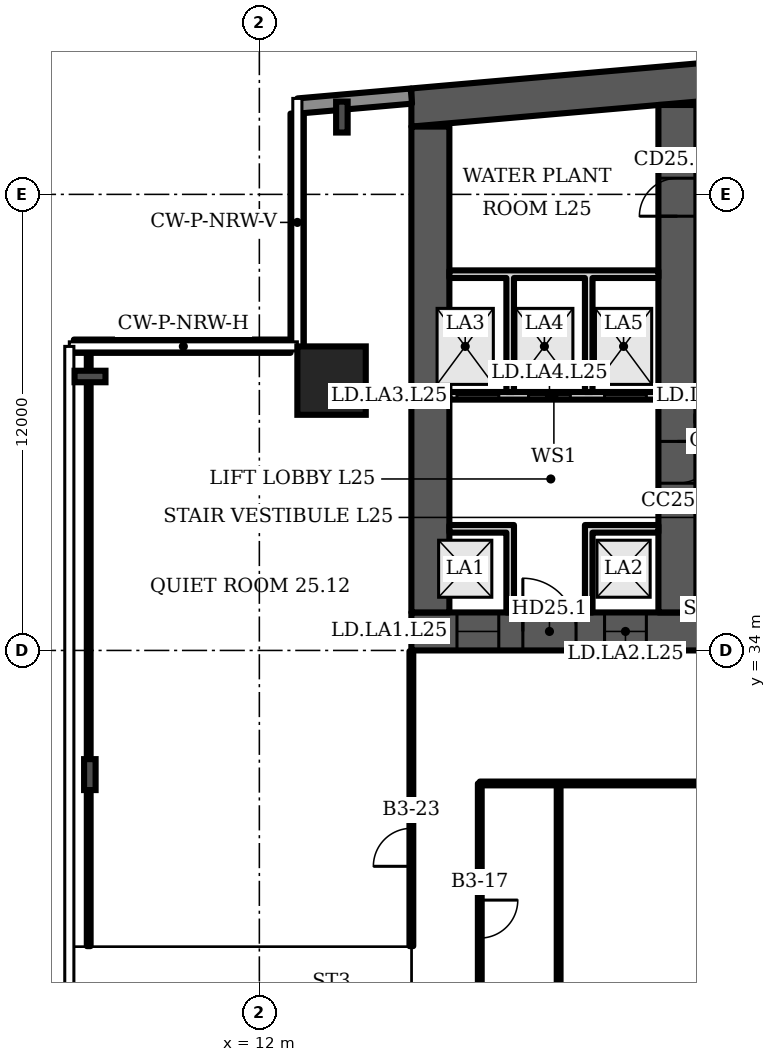
"""IFC4 building model, lengths in metres.
Left out: names, types, materials, properties, quantities, classifications, styles, units other than length and angle.
Written with IfcOpenShell. Run it as: python <this file> out.ifc"""

import sys

from ifc_helpers import new_model, si_unit, direction, frame, frame_2d, origin, origin_2d, place, context, subcontext, project, spatial, polyline, rectangle, i_section, outline, extrude, element, fill, save


model = new_model("IFC4")
c1 = context("Model", 3, precision=1e-05, world=origin(), true_north=direction((0.0, 1.0)))
c2 = subcontext(c1, "Body", "Model", "MODEL_VIEW")
j1 = project(units=[si_unit("LENGTHUNIT", "METRE"), si_unit("PLANEANGLEUNIT", "RADIAN")], contexts=[c1])
p1 = place(None, origin())
s1 = spatial("IfcSite", under=j1, at=p1, CompositionType="ELEMENT")
p2 = place(p1, origin())
s2 = spatial("IfcBuilding", under=s1, at=p2, CompositionType="ELEMENT")
p3 = place(p2, frame((0.0, 0.0, 111.1)))
s3 = spatial("IfcBuildingStorey", under=s2, at=p3, CompositionType="ELEMENT", Elevation=111.1)
p4 = place(p3, frame((0.0, 0.0, -0.0)))
e1 = element("IfcWall", 1, at=p4, inside=s3, PredefinedType="SHEAR", context=c2, shape_type="SweptSolid", body=[
    extrude(outline(polyline([(16.0, 47.784), (40.5, 49.927), (65.0, 47.784), (65.0, 48.787), (40.5, 50.931), (16.0, 48.787), (16.0, 47.784)])), origin(), (0.0, 0.0, 1.0), 3.6),
])
p5 = place(p3, frame((16.0, 34.5, 0.0), z_axis=(0.0, 0.0, 1.0), x_axis=(1.0, 0.0, 0.0)))
e2 = element("IfcWall", 2, at=p5, inside=s3, PredefinedType="SHEAR", context=c2, shape_type="SweptSolid", body=[
    extrude(rectangle(XDim=49.0, YDim=1.0, at=frame_2d((24.5, 0.0))), origin(), (0.0, 0.0, 1.0), 3.6),
])
p6 = place(p5, frame((1.2, 0.0, 0.0)))
e3 = element("IfcOpeningElement", 3, at=p6, cuts=e2, PredefinedType="OPENING", context=c2, shape_type="SweptSolid", body=[
    extrude(rectangle(XDim=1.1, YDim=2.1, at=frame_2d((0.55, 1.05))), frame((0.0, 0.51, 0.0), z_axis=(0.0, -1.0, 0.0), x_axis=(1.0, 0.0, 0.0)), (0.0, 0.0, 1.0), 1.02),
])
p7 = place(p5, frame((5.083, 0.0, 0.0)))
e4 = element("IfcOpeningElement", 4, at=p7, cuts=e2, PredefinedType="OPENING", context=c2, shape_type="SweptSolid", body=[
    extrude(rectangle(XDim=1.1, YDim=2.1, at=frame_2d((0.55, 1.05))), frame((0.0, 0.51, 0.0), z_axis=(0.0, -1.0, 0.0), x_axis=(1.0, 0.0, 0.0)), (0.0, 0.0, 1.0), 1.02),
])
p8 = place(p5, frame((2.933, 0.0, 0.0)))
e5 = element("IfcOpeningElement", 5, at=p8, cuts=e2, PredefinedType="OPENING", context=c2, shape_type="SweptSolid", body=[
    extrude(rectangle(XDim=1.4, YDim=2.1, at=frame_2d((0.7, 1.05))), frame((0.0, 0.51, 0.0), z_axis=(0.0, -1.0, 0.0), x_axis=(1.0, 0.0, 0.0)), (0.0, 0.0, 1.0), 1.02),
])
p9 = place(p5, frame((7.65, 0.0, 0.0)))
e6 = element("IfcOpeningElement", 6, at=p9, cuts=e2, PredefinedType="OPENING", context=c2, shape_type="SweptSolid", body=[
    extrude(rectangle(XDim=1.2, YDim=2.1, at=frame_2d((0.6, 1.05))), frame((0.0, 0.51, 0.0), z_axis=(0.0, -1.0, 0.0), x_axis=(1.0, 0.0, 0.0)), (0.0, 0.0, 1.0), 1.02),
])
p10 = place(p5, frame((14.817, 0.0, 0.0)))
e7 = element("IfcOpeningElement", 7, at=p10, cuts=e2, PredefinedType="OPENING", context=c2, shape_type="SweptSolid", body=[
    extrude(rectangle(XDim=1.1, YDim=2.1, at=frame_2d((0.55, 1.05))), frame((0.0, 0.51, 0.0), z_axis=(0.0, -1.0, 0.0), x_axis=(1.0, 0.0, 0.0)), (0.0, 0.0, 1.0), 1.02),
])
p11 = place(p5, frame((19.083, 0.0, 0.0)))
e8 = element("IfcOpeningElement", 8, at=p11, cuts=e2, PredefinedType="OPENING", context=c2, shape_type="SweptSolid", body=[
    extrude(rectangle(XDim=1.1, YDim=2.1, at=frame_2d((0.55, 1.05))), frame((0.0, 0.51, 0.0), z_axis=(0.0, -1.0, 0.0), x_axis=(1.0, 0.0, 0.0)), (0.0, 0.0, 1.0), 1.02),
])
p12 = place(p5, frame((16.8, 0.0, 0.0)))
e9 = element("IfcOpeningElement", 9, at=p12, cuts=e2, PredefinedType="OPENING", context=c2, shape_type="SweptSolid", body=[
    extrude(rectangle(XDim=1.4, YDim=2.1, at=frame_2d((0.7, 1.05))), frame((0.0, 0.51, 0.0), z_axis=(0.0, -1.0, 0.0), x_axis=(1.0, 0.0, 0.0)), (0.0, 0.0, 1.0), 1.02),
])
p13 = place(p5, frame((21.817, 0.0, 0.0)))
e10 = element("IfcOpeningElement", 10, at=p13, cuts=e2, PredefinedType="OPENING", context=c2, shape_type="SweptSolid", body=[
    extrude(rectangle(XDim=1.1, YDim=2.1, at=frame_2d((0.55, 1.05))), frame((0.0, 0.51, 0.0), z_axis=(0.0, -1.0, 0.0), x_axis=(1.0, 0.0, 0.0)), (0.0, 0.0, 1.0), 1.02),
])
p14 = place(p5, frame((26.083, 0.0, 0.0)))
e11 = element("IfcOpeningElement", 11, at=p14, cuts=e2, PredefinedType="OPENING", context=c2, shape_type="SweptSolid", body=[
    extrude(rectangle(XDim=1.1, YDim=2.1, at=frame_2d((0.55, 1.05))), frame((0.0, 0.51, 0.0), z_axis=(0.0, -1.0, 0.0), x_axis=(1.0, 0.0, 0.0)), (0.0, 0.0, 1.0), 1.02),
])
p15 = place(p5, frame((33.15, 0.0, 0.0)))
e12 = element("IfcOpeningElement", 12, at=p15, cuts=e2, PredefinedType="OPENING", context=c2, shape_type="SweptSolid", body=[
    extrude(rectangle(XDim=1.2, YDim=2.1, at=frame_2d((0.6, 1.05))), frame((0.0, 0.51, 0.0), z_axis=(0.0, -1.0, 0.0), x_axis=(1.0, 0.0, 0.0)), (0.0, 0.0, 1.0), 1.02),
])
p16 = place(p5, frame((37.8, 0.0, 0.0)))
e13 = element("IfcOpeningElement", 13, at=p16, cuts=e2, PredefinedType="OPENING", context=c2, shape_type="SweptSolid", body=[
    extrude(rectangle(XDim=1.4, YDim=2.1, at=frame_2d((0.7, 1.05))), frame((0.0, 0.51, 0.0), z_axis=(0.0, -1.0, 0.0), x_axis=(1.0, 0.0, 0.0)), (0.0, 0.0, 1.0), 1.02),
])
p17 = place(p5, frame((42.817, 0.0, 0.0)))
e14 = element("IfcOpeningElement", 14, at=p17, cuts=e2, PredefinedType="OPENING", context=c2, shape_type="SweptSolid", body=[
    extrude(rectangle(XDim=1.1, YDim=2.1, at=frame_2d((0.55, 1.05))), frame((0.0, 0.51, 0.0), z_axis=(0.0, -1.0, 0.0), x_axis=(1.0, 0.0, 0.0)), (0.0, 0.0, 1.0), 1.02),
])
p18 = place(p5, frame((46.7, 0.0, 0.0)))
e15 = element("IfcOpeningElement", 15, at=p18, cuts=e2, PredefinedType="OPENING", context=c2, shape_type="SweptSolid", body=[
    extrude(rectangle(XDim=1.1, YDim=2.1, at=frame_2d((0.55, 1.05))), frame((0.0, 0.51, 0.0), z_axis=(0.0, -1.0, 0.0), x_axis=(1.0, 0.0, 0.0)), (0.0, 0.0, 1.0), 1.02),
])
p19 = place(p5, frame((44.667, 0.0, 0.0)))
e16 = element("IfcOpeningElement", 16, at=p19, cuts=e2, PredefinedType="OPENING", context=c2, shape_type="SweptSolid", body=[
    extrude(rectangle(XDim=1.4, YDim=2.1, at=frame_2d((0.7, 1.05))), frame((0.0, 0.51, 0.0), z_axis=(0.0, -1.0, 0.0), x_axis=(1.0, 0.0, 0.0)), (0.0, 0.0, 1.0), 1.02),
])
p20 = place(p3, frame((16.5, 35.0, 0.0), z_axis=(0.0, 0.0, 1.0), x_axis=(0.0, 1.0, 0.0)))
e17 = element("IfcWall", 17, at=p20, inside=s3, PredefinedType="SHEAR", context=c2, shape_type="SweptSolid", body=[
    extrude(rectangle(XDim=12.784, YDim=1.0, at=frame_2d((6.392, 0.0))), origin(), (0.0, 0.0, 1.0), 3.6),
])
p21 = place(p3, frame((23.0, 35.0, 0.0), z_axis=(0.0, 0.0, 1.0), x_axis=(0.0, 1.0, 0.0)))
e18 = element("IfcWall", 18, at=p21, inside=s3, PredefinedType="SHEAR", context=c2, shape_type="SweptSolid", body=[
    extrude(rectangle(XDim=13.352, YDim=1.0, at=frame_2d((6.676, 0.0))), origin(), (0.0, 0.0, 1.0), 3.6),
])
p22 = place(p21, frame((10.426, 0.0, 0.0)))
e19 = element("IfcOpeningElement", 19, at=p22, cuts=e18, PredefinedType="OPENING", context=c2, shape_type="SweptSolid", body=[
    extrude(rectangle(XDim=1.0, YDim=2.1, at=frame_2d((0.5, 1.05))), frame((0.0, 0.51, 0.0), z_axis=(0.0, -1.0, 0.0), x_axis=(1.0, 0.0, 0.0)), (0.0, 0.0, 1.0), 1.02),
])
p23 = place(p21, frame((3.4, 0.0, 0.0)))
e20 = element("IfcOpeningElement", 20, at=p23, cuts=e18, PredefinedType="OPENING", context=c2, shape_type="SweptSolid", body=[
    extrude(rectangle(XDim=1.1, YDim=2.1, at=frame_2d((0.55, 1.05))), frame((0.0, 0.51, 0.0), z_axis=(0.0, -1.0, 0.0), x_axis=(1.0, 0.0, 0.0)), (0.0, 0.0, 1.0), 1.02),
])
p24 = place(p3, frame((13.9, 41.1, 0.0), z_axis=(0.0, 0.0, 1.0), x_axis=(1.0, 0.0, 0.0)))
e21 = element("IfcColumn", 21, at=p24, inside=s3, PredefinedType="COLUMN", context=c2, shape_type="SweptSolid", body=[
    extrude(rectangle(XDim=1.8, YDim=1.8, at=origin_2d()), origin(), (0.0, 0.0, 1.0), 3.6),
])
for number, where, z_axis, x_axis in (
    (22, (14.172, 48.034, 0.0), (0.0, 0.0, 1.0), (-1.0, 0.0, 0.0)),
    (23, (7.544, 41.208, 0.0), (0.0, 0.0, 1.0), (0.0, 1.0, 0.0)),
    (24, (7.54, 30.733, 0.0), (0.0, 0.0, 1.0), (-1.0, 0.0, 0.0)),
):
    element("IfcColumn", number, at=place(p3, frame(where, z_axis=z_axis, x_axis=x_axis)), inside=s3, PredefinedType="COLUMN", context=c2, shape_type="SweptSolid", body=[
        extrude(i_section(OverallWidth=0.303, OverallDepth=0.814, WebThickness=0.021, FlangeThickness=0.04, FilletRadius=0.03, at=origin_2d()), origin(), (0.0, 0.0, 1.0), 3.6),
    ])
p25 = place(p3, frame((16.0, 48.587, 0.0), z_axis=(0.0, 0.0, 1.0), x_axis=(-0.996194, -0.087168, 0.0)))
e25 = element("IfcWall", 25, at=p25, inside=s3, PredefinedType="SOLIDWALL", context=c2, shape_type="SweptSolid", body=[
    extrude(rectangle(XDim=2.994, YDim=0.4, at=frame_2d((1.497, 0.0))), origin(), (0.0, 0.0, 1.0), 3.2),
])
p26 = place(p3, frame((12.995, 48.126, 0.0), z_axis=(0.0, 0.0, 1.0), x_axis=(0.0, -1.0, 0.0)))
e26 = element("IfcWall", 26, at=p26, inside=s3, PredefinedType="SOLIDWALL", context=c2, shape_type="SweptSolid", body=[
    extrude(rectangle(XDim=6.126, YDim=0.35, at=frame_2d((3.063, 0.0))), origin(), (0.0, 0.0, 1.0), 1.0),
])
p27 = place(p3, frame((12.82, 42.005, 0.0), z_axis=(0.0, 0.0, 1.0), x_axis=(-1.0, 0.0, 0.0)))
e27 = element("IfcWall", 27, at=p27, inside=s3, PredefinedType="SOLIDWALL", context=c2, shape_type="SweptSolid", body=[
    extrude(rectangle(XDim=5.7, YDim=0.35, at=frame_2d((2.85, 0.0))), origin(), (0.0, 0.0, 1.0), 1.0),
])
p28 = place(p3, frame((17.0, 40.7, 0.0), z_axis=(0.0, 0.0, 1.0), x_axis=(1.0, 0.0, 0.0)))
e28 = element("IfcWall", 28, at=p28, inside=s3, PredefinedType="PARTITIONING", context=c2, shape_type="SweptSolid", body=[
    extrude(rectangle(XDim=5.5, YDim=0.2, at=frame_2d((2.75, 0.0))), origin(), (0.0, 0.0, 1.0), 3.2),
])
p29 = place(p28, frame((0.2, 0.0, 0.0)))
e29 = element("IfcOpeningElement", 29, at=p29, cuts=e28, PredefinedType="OPENING", context=c2, shape_type="SweptSolid", body=[
    extrude(rectangle(XDim=1.1, YDim=2.1, at=frame_2d((0.55, 1.05))), frame((0.0, 0.11, 0.0), z_axis=(0.0, -1.0, 0.0), x_axis=(1.0, 0.0, 0.0)), (0.0, 0.0, 1.0), 0.22),
])
p30 = place(p28, frame((2.083, 0.0, 0.0)))
e30 = element("IfcOpeningElement", 30, at=p30, cuts=e28, PredefinedType="OPENING", context=c2, shape_type="SweptSolid", body=[
    extrude(rectangle(XDim=1.1, YDim=2.1, at=frame_2d((0.55, 1.05))), frame((0.0, 0.11, 0.0), z_axis=(0.0, -1.0, 0.0), x_axis=(1.0, 0.0, 0.0)), (0.0, 0.0, 1.0), 0.22),
])
p31 = place(p28, frame((4.083, 0.0, 0.0)))
e31 = element("IfcOpeningElement", 31, at=p31, cuts=e28, PredefinedType="OPENING", context=c2, shape_type="SweptSolid", body=[
    extrude(rectangle(XDim=1.1, YDim=2.1, at=frame_2d((0.55, 1.05))), frame((0.0, 0.11, 0.0), z_axis=(0.0, -1.0, 0.0), x_axis=(1.0, 0.0, 0.0)), (0.0, 0.0, 1.0), 0.22),
])
p32 = place(p3, frame((0.0, 0.0, -0.0)))
e32 = element("IfcWall", 32, at=p32, inside=s3, PredefinedType="PARTITIONING", context=c2, shape_type="SweptSolid", body=[
    extrude(outline(polyline([(18.5, 37.1), (17.0, 37.1), (17.0, 37.3), (18.5, 37.3), (18.7, 37.3), (18.7, 35.0), (18.5, 35.0), (18.5, 37.1)])), origin(), (0.0, 0.0, 1.0), 3.2),
])
p33 = place(p3, frame((0.0, 0.0, -0.0)))
e33 = element("IfcWall", 33, at=p33, inside=s3, PredefinedType="PARTITIONING", context=c2, shape_type="SweptSolid", body=[
    extrude(outline(polyline([(20.567, 37.3), (20.767, 37.3), (22.5, 37.3), (22.5, 37.1), (20.767, 37.1), (20.767, 35.0), (20.567, 35.0), (20.567, 37.3)])), origin(), (0.0, 0.0, 1.0), 3.2),
])
p34 = place(p3, frame((0.0, 0.0, -0.0)))
e34 = element("IfcWall", 34, at=p34, inside=s3, PredefinedType="PARTITIONING", context=c2, shape_type="SweptSolid", body=[
    extrude(outline(polyline([(18.7, 40.8), (18.5, 40.8), (18.5, 43.8), (17.0, 43.8), (17.0, 44.0), (22.5, 44.0), (22.5, 43.8), (20.767, 43.8), (20.767, 40.8), (20.567, 40.8), (20.567, 43.8), (18.7, 43.8), (18.7, 40.8)])), origin(), (0.0, 0.0, 1.0), 3.2),
])
p35 = place(p3, frame((7.51, 26.22, 0.0), z_axis=(0.0, 0.0, 1.0), x_axis=(0.0, 1.0, 0.0)))
e35 = element("IfcWall", 35, at=p35, inside=s3, PredefinedType="PARTITIONING", context=c2, shape_type="SweptSolid", body=[
    extrude(rectangle(XDim=15.76, YDim=0.1, at=frame_2d((7.88, 0.0))), origin(), (0.0, 0.0, 1.0), 2.58),
])
p36 = place(p3, frame((16.0, 26.22, 0.0), z_axis=(0.0, 0.0, 1.0), x_axis=(0.0, 1.0, 0.0)))
e36 = element("IfcWall", 36, at=p36, inside=s3, PredefinedType="PARTITIONING", context=c2, shape_type="SweptSolid", body=[
    extrude(rectangle(XDim=7.76, YDim=0.1, at=frame_2d((3.88, 0.0))), origin(), (0.0, 0.0, 1.0), 3.2),
])
p37 = place(p36, frame((2.1, 0.0, 0.0)))
e37 = element("IfcOpeningElement", 37, at=p37, cuts=e36, PredefinedType="OPENING", context=c2, shape_type="SweptSolid", body=[
    extrude(rectangle(XDim=1.0, YDim=2.1, at=frame_2d((0.5, 1.05))), frame((0.0, 0.06, 0.0), z_axis=(0.0, -1.0, 0.0), x_axis=(1.0, 0.0, 0.0)), (0.0, 0.0, 1.0), 0.12),
])
p38 = place(p3, frame((17.8, 21.8, 0.0), z_axis=(0.0, 0.0, 1.0), x_axis=(0.0, 1.0, 0.0)))
e38 = element("IfcWall", 38, at=p38, inside=s3, PredefinedType="PARTITIONING", context=c2, shape_type="SweptSolid", body=[
    extrude(rectangle(XDim=8.7, YDim=0.1, at=frame_2d((4.35, 0.0))), origin(), (0.0, 0.0, 1.0), 3.2),
])
p39 = place(p38, frame((4.631, 0.0, 0.0)))
e39 = element("IfcOpeningElement", 39, at=p39, cuts=e38, PredefinedType="OPENING", context=c2, shape_type="SweptSolid", body=[
    extrude(rectangle(XDim=1.0, YDim=2.1, at=frame_2d((0.5, 1.05))), frame((0.0, 0.06, 0.0), z_axis=(0.0, -1.0, 0.0), x_axis=(1.0, 0.0, 0.0)), (0.0, 0.0, 1.0), 0.12),
])
p40 = place(p3, frame((17.8, 30.5, 0.0), z_axis=(0.0, 0.0, 1.0), x_axis=(1.0, 0.0, 0.0)))
e40 = element("IfcWall", 40, at=p40, inside=s3, PredefinedType="PARTITIONING", context=c2, shape_type="SweptSolid", body=[
    extrude(rectangle(XDim=13.8, YDim=0.1, at=frame_2d((6.9, 0.0))), origin(), (0.0, 0.0, 1.0), 3.2),
])
p41 = place(p3, frame((19.875, 15.13, 0.0), z_axis=(0.0, 0.0, 1.0), x_axis=(0.0, 1.0, 0.0)))
e41 = element("IfcWall", 41, at=p41, inside=s3, PredefinedType="PARTITIONING", context=c2, shape_type="SweptSolid", body=[
    extrude(rectangle(XDim=15.37, YDim=0.1, at=frame_2d((7.685, 0.0))), origin(), (0.0, 0.0, 1.0), 3.2),
])
p42 = place(p6, origin())
e42 = element("IfcDoor", 42, at=p42, inside=s3, OperationType="DOUBLE_DOOR_SLIDING", PredefinedType="DOOR", context=c2, shape_type="SweptSolid", body=[
    extrude(rectangle(XDim=1.1, YDim=2.1, at=frame_2d((0.55, 1.05))), frame((0.0, 0.025, 0.0), z_axis=(0.0, -1.0, 0.0), x_axis=(1.0, 0.0, 0.0)), (0.0, 0.0, 1.0), 0.05),
])
fill(e3, e42)
p43 = place(p7, origin())
e43 = element("IfcDoor", 43, at=p43, inside=s3, OperationType="DOUBLE_DOOR_SLIDING", PredefinedType="DOOR", context=c2, shape_type="SweptSolid", body=[
    extrude(rectangle(XDim=1.1, YDim=2.1, at=frame_2d((0.55, 1.05))), frame((0.0, 0.025, 0.0), z_axis=(0.0, -1.0, 0.0), x_axis=(1.0, 0.0, 0.0)), (0.0, 0.0, 1.0), 0.05),
])
fill(e4, e43)
p44 = place(p8, origin())
e44 = element("IfcDoor", 44, at=p44, inside=s3, OperationType="DOUBLE_DOOR_SINGLE_SWING", PredefinedType="DOOR", context=c2, shape_type="SweptSolid", body=[
    extrude(rectangle(XDim=1.4, YDim=2.1, at=frame_2d((0.7, 1.05))), frame((0.0, 0.025, 0.0), z_axis=(0.0, -1.0, 0.0), x_axis=(1.0, 0.0, 0.0)), (0.0, 0.0, 1.0), 0.05),
])
fill(e5, e44)
p45 = place(p29, origin())
e45 = element("IfcDoor", 45, at=p45, inside=s3, OperationType="DOUBLE_DOOR_SLIDING", PredefinedType="DOOR", context=c2, shape_type="SweptSolid", body=[
    extrude(rectangle(XDim=1.1, YDim=2.1, at=frame_2d((0.55, 1.05))), frame((0.0, 0.025, 0.0), z_axis=(0.0, -1.0, 0.0), x_axis=(1.0, 0.0, 0.0)), (0.0, 0.0, 1.0), 0.05),
])
fill(e29, e45)
p46 = place(p30, origin())
e46 = element("IfcDoor", 46, at=p46, inside=s3, OperationType="DOUBLE_DOOR_SLIDING", PredefinedType="DOOR", context=c2, shape_type="SweptSolid", body=[
    extrude(rectangle(XDim=1.1, YDim=2.1, at=frame_2d((0.55, 1.05))), frame((0.0, 0.025, 0.0), z_axis=(0.0, -1.0, 0.0), x_axis=(1.0, 0.0, 0.0)), (0.0, 0.0, 1.0), 0.05),
])
fill(e30, e46)
p47 = place(p31, origin())
e47 = element("IfcDoor", 47, at=p47, inside=s3, OperationType="DOUBLE_DOOR_SLIDING", PredefinedType="DOOR", context=c2, shape_type="SweptSolid", body=[
    extrude(rectangle(XDim=1.1, YDim=2.1, at=frame_2d((0.55, 1.05))), frame((0.0, 0.025, 0.0), z_axis=(0.0, -1.0, 0.0), x_axis=(1.0, 0.0, 0.0)), (0.0, 0.0, 1.0), 0.05),
])
fill(e31, e47)
p48 = place(p22, origin())
e48 = element("IfcDoor", 48, at=p48, inside=s3, OperationType="SINGLE_SWING_LEFT", PredefinedType="DOOR", context=c2, shape_type="SweptSolid", body=[
    extrude(rectangle(XDim=1.0, YDim=2.1, at=frame_2d((0.5, 1.05))), frame((0.0, 0.5, 0.0), z_axis=(0.0, -1.0, 0.0), x_axis=(1.0, 0.0, 0.0)), (0.0, 0.0, 1.0), 1.0),
])
fill(e19, e48)
p49 = place(p23, origin())
e49 = element("IfcDoor", 49, at=p49, inside=s3, OperationType="SINGLE_SWING_RIGHT", PredefinedType="DOOR", context=c2, shape_type="SweptSolid", body=[
    extrude(rectangle(XDim=1.1, YDim=2.1, at=frame_2d((0.55, 1.05))), frame((0.0, 0.025, 0.0), z_axis=(0.0, -1.0, 0.0), x_axis=(1.0, 0.0, 0.0)), (0.0, 0.0, 1.0), 0.05),
])
fill(e20, e49)
p50 = place(p39, origin())
e50 = element("IfcDoor", 50, at=p50, inside=s3, OperationType="SINGLE_SWING_RIGHT", PredefinedType="DOOR", context=c2, shape_type="SweptSolid", body=[
    extrude(rectangle(XDim=1.0, YDim=2.1, at=frame_2d((0.5, 1.05))), frame((0.0, 0.025, 0.0), z_axis=(0.0, -1.0, 0.0), x_axis=(1.0, 0.0, 0.0)), (0.0, 0.0, 1.0), 0.05),
])
fill(e39, e50)
p51 = place(p37, origin())
e51 = element("IfcDoor", 51, at=p51, inside=s3, OperationType="SINGLE_SWING_LEFT", PredefinedType="DOOR", context=c2, shape_type="SweptSolid", body=[
    extrude(rectangle(XDim=1.0, YDim=2.1, at=frame_2d((0.5, 1.05))), frame((0.0, 0.025, 0.0), z_axis=(0.0, -1.0, 0.0), x_axis=(1.0, 0.0, 0.0)), (0.0, 0.0, 1.0), 0.05),
])
fill(e37, e51)
save(model, sys.argv[1])
